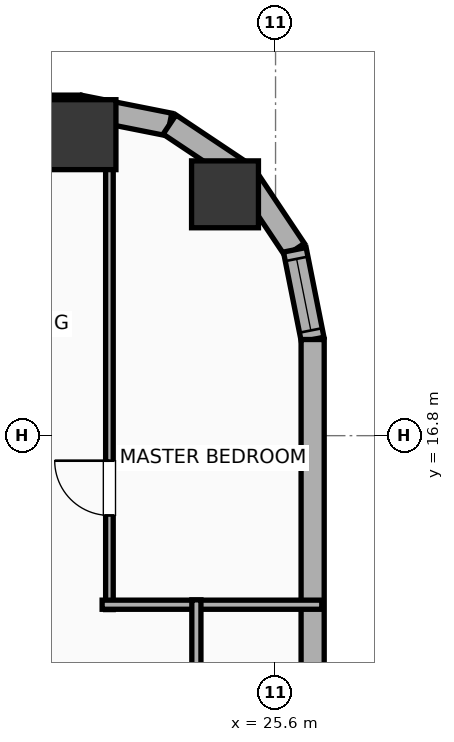
"""IFC4 building model, lengths in metres.
Left out: names, types, materials, properties, quantities, classifications, styles, units other than length and angle.
Written with IfcOpenShell. Run it as: python <this file> out.ifc"""

import sys

from ifc_helpers import new_model, si_unit, direction, frame, frame_2d, origin, origin_2d, place, context, subcontext, project, spatial, rectangle, hollow_rectangle, hollow_circle, extrude, element, fill, save


model = new_model("IFC4")
c1 = context("Model", 3, precision=1e-05, world=origin(), true_north=direction((0.0, 1.0)))
c2 = subcontext(c1, "Body", "Model", "MODEL_VIEW")
j1 = project(units=[si_unit("LENGTHUNIT", "METRE"), si_unit("PLANEANGLEUNIT", "RADIAN")], contexts=[c1])
p1 = place(None, origin())
s1 = spatial("IfcSite", under=j1, at=p1, CompositionType="ELEMENT")
p2 = place(p1, origin())
s2 = spatial("IfcBuilding", under=s1, at=p2, CompositionType="ELEMENT")
p3 = place(p2, frame((0.0, 0.0, 29.9)))
s3 = spatial("IfcBuildingStorey", under=s2, at=p3, CompositionType="ELEMENT", Elevation=29.9)
p4 = place(p3, frame((24.769, 20.769, 0.0), z_axis=(0.0, 0.0, 1.0), x_axis=(1.0, 0.0, 0.0)))
e1 = element("IfcColumn", 1, at=p4, inside=s3, PredefinedType="COLUMN", context=c2, shape_type="SweptSolid", body=[
    extrude(hollow_circle(Radius=0.55, WallThickness=0.036, at=origin_2d()), origin(), (0.0, 0.0, 1.0), 3.9),
])
p5 = place(p3, frame((22.4, 21.75, 0.0), z_axis=(0.0, 0.0, 1.0), x_axis=(1.0, 0.0, 0.0)))
e2 = element("IfcColumn", 2, at=p5, inside=s3, PredefinedType="COLUMN", context=c2, shape_type="SweptSolid", body=[
    extrude(hollow_rectangle(XDim=1.15, YDim=1.15, WallThickness=0.04, at=origin_2d()), origin(), (0.0, 0.0, 1.0), 3.9),
])
p6 = place(p3, frame((-29.581, 22.21, 0.0), z_axis=(0.0, 0.0, 1.0), x_axis=(1.0, 0.0, 0.0)))
e3 = element("IfcWall", 3, at=p6, inside=s3, PredefinedType="ELEMENTEDWALL", context=c2, shape_type="SweptSolid", body=[
    extrude(rectangle(XDim=51.963, YDim=0.38, at=frame_2d((25.981, 0.0))), origin(), (0.0, 0.0, 1.0), 2.54),
])
p7 = place(p6, frame((5.81, 0.0, 0.75)))
e4 = element("IfcOpeningElement", 4, at=p7, cuts=e3, PredefinedType="OPENING", context=c2, shape_type="SweptSolid", body=[
    extrude(rectangle(XDim=2.4, YDim=1.63, at=frame_2d((1.2, 0.815))), frame((0.0, 0.2, 0.0), z_axis=(0.0, -1.0, 0.0), x_axis=(1.0, 0.0, 0.0)), (0.0, 0.0, 1.0), 0.4),
])
p8 = place(p6, frame((42.952, 0.0, 0.75)))
e5 = element("IfcOpeningElement", 5, at=p8, cuts=e3, PredefinedType="OPENING", context=c2, shape_type="SweptSolid", body=[
    extrude(rectangle(XDim=2.4, YDim=1.63, at=frame_2d((1.2, 0.815))), frame((0.0, 0.2, 0.0), z_axis=(0.0, -1.0, 0.0), x_axis=(1.0, 0.0, 0.0)), (0.0, 0.0, 1.0), 0.4),
])
p9 = place(p6, frame((1.436, 0.0, 0.75)))
e6 = element("IfcOpeningElement", 6, at=p9, cuts=e3, PredefinedType="OPENING", context=c2, shape_type="SweptSolid", body=[
    extrude(rectangle(XDim=1.2, YDim=1.63, at=frame_2d((0.6, 0.815))), frame((0.0, 0.2, 0.0), z_axis=(0.0, -1.0, 0.0), x_axis=(1.0, 0.0, 0.0)), (0.0, 0.0, 1.0), 0.4),
])
p10 = place(p6, frame((3.686, 0.0, 0.75)))
e7 = element("IfcOpeningElement", 7, at=p10, cuts=e3, PredefinedType="OPENING", context=c2, shape_type="SweptSolid", body=[
    extrude(rectangle(XDim=1.2, YDim=1.63, at=frame_2d((0.6, 0.815))), frame((0.0, 0.2, 0.0), z_axis=(0.0, -1.0, 0.0), x_axis=(1.0, 0.0, 0.0)), (0.0, 0.0, 1.0), 0.4),
])
p11 = place(p6, frame((11.221, 0.0, 0.75)))
e8 = element("IfcOpeningElement", 8, at=p11, cuts=e3, PredefinedType="OPENING", context=c2, shape_type="SweptSolid", body=[
    extrude(rectangle(XDim=1.2, YDim=1.63, at=frame_2d((0.6, 0.815))), frame((0.0, 0.2, 0.0), z_axis=(0.0, -1.0, 0.0), x_axis=(1.0, 0.0, 0.0)), (0.0, 0.0, 1.0), 0.4),
])
p12 = place(p6, frame((17.686, 0.0, 0.75)))
e9 = element("IfcOpeningElement", 9, at=p12, cuts=e3, PredefinedType="OPENING", context=c2, shape_type="SweptSolid", body=[
    extrude(rectangle(XDim=1.2, YDim=1.63, at=frame_2d((0.6, 0.815))), frame((0.0, 0.2, 0.0), z_axis=(0.0, -1.0, 0.0), x_axis=(1.0, 0.0, 0.0)), (0.0, 0.0, 1.0), 0.4),
])
p13 = place(p6, frame((14.886, 0.0, 0.75)))
e10 = element("IfcOpeningElement", 10, at=p13, cuts=e3, PredefinedType="OPENING", context=c2, shape_type="SweptSolid", body=[
    extrude(rectangle(XDim=1.2, YDim=1.63, at=frame_2d((0.6, 0.815))), frame((0.0, 0.2, 0.0), z_axis=(0.0, -1.0, 0.0), x_axis=(1.0, 0.0, 0.0)), (0.0, 0.0, 1.0), 0.4),
])
p14 = place(p6, frame((22.181, 0.0, 0.75)))
e11 = element("IfcOpeningElement", 11, at=p14, cuts=e3, PredefinedType="OPENING", context=c2, shape_type="SweptSolid", body=[
    extrude(rectangle(XDim=1.2, YDim=1.63, at=frame_2d((0.6, 0.815))), frame((0.0, 0.2, 0.0), z_axis=(0.0, -1.0, 0.0), x_axis=(1.0, 0.0, 0.0)), (0.0, 0.0, 1.0), 0.4),
])
p15 = place(p6, frame((28.926, 0.0, 0.75)))
e12 = element("IfcOpeningElement", 12, at=p15, cuts=e3, PredefinedType="OPENING", context=c2, shape_type="SweptSolid", body=[
    extrude(rectangle(XDim=1.2, YDim=1.63, at=frame_2d((0.6, 0.815))), frame((0.0, 0.2, 0.0), z_axis=(0.0, -1.0, 0.0), x_axis=(1.0, 0.0, 0.0)), (0.0, 0.0, 1.0), 0.4),
])
p16 = place(p6, frame((26.126, 0.0, 0.75)))
e13 = element("IfcOpeningElement", 13, at=p16, cuts=e3, PredefinedType="OPENING", context=c2, shape_type="SweptSolid", body=[
    extrude(rectangle(XDim=1.2, YDim=1.63, at=frame_2d((0.6, 0.815))), frame((0.0, 0.2, 0.0), z_axis=(0.0, -1.0, 0.0), x_axis=(1.0, 0.0, 0.0)), (0.0, 0.0, 1.0), 0.4),
])
p17 = place(p6, frame((32.276, 0.0, 0.75)))
e14 = element("IfcOpeningElement", 14, at=p17, cuts=e3, PredefinedType="OPENING", context=c2, shape_type="SweptSolid", body=[
    extrude(rectangle(XDim=1.2, YDim=1.63, at=frame_2d((0.6, 0.815))), frame((0.0, 0.2, 0.0), z_axis=(0.0, -1.0, 0.0), x_axis=(1.0, 0.0, 0.0)), (0.0, 0.0, 1.0), 0.4),
])
p18 = place(p6, frame((35.076, 0.0, 0.75)))
e15 = element("IfcOpeningElement", 15, at=p18, cuts=e3, PredefinedType="OPENING", context=c2, shape_type="SweptSolid", body=[
    extrude(rectangle(XDim=1.2, YDim=1.63, at=frame_2d((0.6, 0.815))), frame((0.0, 0.2, 0.0), z_axis=(0.0, -1.0, 0.0), x_axis=(1.0, 0.0, 0.0)), (0.0, 0.0, 1.0), 0.4),
])
p19 = place(p6, frame((38.981, 0.0, 0.75)))
e16 = element("IfcOpeningElement", 16, at=p19, cuts=e3, PredefinedType="OPENING", context=c2, shape_type="SweptSolid", body=[
    extrude(rectangle(XDim=1.2, YDim=1.63, at=frame_2d((0.6, 0.815))), frame((0.0, 0.2, 0.0), z_axis=(0.0, -1.0, 0.0), x_axis=(1.0, 0.0, 0.0)), (0.0, 0.0, 1.0), 0.4),
])
p20 = place(p6, frame((46.276, 0.0, 0.75)))
e17 = element("IfcOpeningElement", 17, at=p20, cuts=e3, PredefinedType="OPENING", context=c2, shape_type="SweptSolid", body=[
    extrude(rectangle(XDim=1.2, YDim=1.63, at=frame_2d((0.6, 0.815))), frame((0.0, 0.2, 0.0), z_axis=(0.0, -1.0, 0.0), x_axis=(1.0, 0.0, 0.0)), (0.0, 0.0, 1.0), 0.4),
])
p21 = place(p6, frame((48.927, 0.0, 0.75)))
e18 = element("IfcOpeningElement", 18, at=p21, cuts=e3, PredefinedType="OPENING", context=c2, shape_type="SweptSolid", body=[
    extrude(rectangle(XDim=1.2, YDim=1.63, at=frame_2d((0.6, 0.815))), frame((0.0, 0.2, 0.0), z_axis=(0.0, -1.0, 0.0), x_axis=(1.0, 0.0, 0.0)), (0.0, 0.0, 1.0), 0.4),
])
p22 = place(p3, frame((22.381, 22.21, 0.0), z_axis=(0.0, 0.0, 1.0), x_axis=(0.980786132421, -0.195086038585, 0.0)))
e19 = element("IfcWall", 19, at=p22, inside=s3, PredefinedType="ELEMENTEDWALL", context=c2, shape_type="SweptSolid", body=[
    extrude(rectangle(XDim=1.504, YDim=0.38, at=frame_2d((0.752, 0.0))), origin(), (0.0, 0.0, 1.0), 2.54),
])
p23 = place(p3, frame((23.857, 21.917, 0.0), z_axis=(0.0, 0.0, 1.0), x_axis=(0.831392092774, -0.555686231674, 0.0)))
e20 = element("IfcWall", 20, at=p23, inside=s3, PredefinedType="ELEMENTEDWALL", context=c2, shape_type="SweptSolid", body=[
    extrude(rectangle(XDim=1.485, YDim=0.38, at=frame_2d((0.743, 0.0))), origin(), (0.0, 0.0, 1.0), 2.54),
])
p24 = place(p3, frame((25.091, 21.091, 0.0), z_axis=(0.0, 0.0, 1.0), x_axis=(0.555686231674, -0.831392092774, 0.0)))
e21 = element("IfcWall", 21, at=p24, inside=s3, PredefinedType="ELEMENTEDWALL", context=c2, shape_type="SweptSolid", body=[
    extrude(rectangle(XDim=1.485, YDim=0.38, at=frame_2d((0.743, 0.0))), origin(), (0.0, 0.0, 1.0), 3.65),
])
p25 = place(p3, frame((25.917, 19.857, 0.0), z_axis=(0.0, 0.0, 1.0), x_axis=(0.195086038585, -0.980786132421, 0.0)))
e22 = element("IfcWall", 22, at=p25, inside=s3, PredefinedType="ELEMENTEDWALL", context=c2, shape_type="SweptSolid", body=[
    extrude(rectangle(XDim=1.504, YDim=0.38, at=frame_2d((0.752, 0.0))), origin(), (0.0, 0.0, 1.0), 3.65),
])
p26 = place(p25, frame((0.152, 0.0, 0.75)))
e23 = element("IfcOpeningElement", 23, at=p26, cuts=e22, PredefinedType="OPENING", context=c2, shape_type="SweptSolid", body=[
    extrude(rectangle(XDim=1.2, YDim=2.05, at=frame_2d((0.6, 1.025))), frame((0.0, 0.2, 0.0), z_axis=(0.0, -1.0, 0.0), x_axis=(1.0, 0.0, 0.0)), (0.0, 0.0, 1.0), 0.4),
])
p27 = place(p3, frame((26.21, 18.381, 0.0), z_axis=(0.0, 0.0, 1.0), x_axis=(0.0, -1.0, 0.0)))
e24 = element("IfcWall", 24, at=p27, inside=s3, PredefinedType="ELEMENTEDWALL", context=c2, shape_type="SweptSolid", body=[
    extrude(rectangle(XDim=36.763, YDim=0.38, at=frame_2d((18.381, 0.0))), origin(), (0.0, 0.0, 1.0), 2.54),
])
p28 = place(p27, frame((33.537, 0.0, 0.75)))
e25 = element("IfcOpeningElement", 25, at=p28, cuts=e24, PredefinedType="OPENING", context=c2, shape_type="SweptSolid", body=[
    extrude(rectangle(XDim=1.2, YDim=1.63, at=frame_2d((0.6, 0.815))), frame((0.0, 0.2, 0.0), z_axis=(0.0, -1.0, 0.0), x_axis=(1.0, 0.0, 0.0)), (0.0, 0.0, 1.0), 0.4),
])
p29 = place(p3, frame((22.868, 13.94, 0.0), z_axis=(0.0, 0.0, 1.0), x_axis=(0.0, 1.0, 0.0)))
e26 = element("IfcWall", 26, at=p29, inside=s3, PredefinedType="PARTITIONING", context=c2, shape_type="SweptSolid", body=[
    extrude(rectangle(XDim=8.326, YDim=0.125, at=frame_2d((4.163, 0.0))), origin(), (0.0, 0.0, 1.0), 2.54),
])
p30 = place(p29, frame((1.548, 0.0, 0.0)))
e27 = element("IfcOpeningElement", 27, at=p30, cuts=e26, PredefinedType="OPENING", context=c2, shape_type="SweptSolid", body=[
    extrude(rectangle(XDim=0.9, YDim=2.05, at=frame_2d((0.45, 1.025))), frame((0.0, 0.073, 0.0), z_axis=(0.0, -1.0, 0.0), x_axis=(1.0, 0.0, 0.0)), (0.0, 0.0, 1.0), 0.145),
])
p31 = place(p3, frame((22.748, 14.02, 0.0), z_axis=(0.0, 0.0, 1.0), x_axis=(1.0, 0.0, 0.0)))
e28 = element("IfcWall", 28, at=p31, inside=s3, PredefinedType="PLUMBINGWALL", context=c2, shape_type="SweptSolid", body=[
    extrude(rectangle(XDim=3.612, YDim=0.15, at=frame_2d((1.806, 0.0))), origin(), (0.0, 0.0, 1.0), 3.65),
])
p32 = place(p3, frame((24.298, 10.78, 0.0), z_axis=(0.0, 0.0, 1.0), x_axis=(0.0, 1.0, 0.0)))
e29 = element("IfcWall", 29, at=p32, inside=s3, PredefinedType="PLUMBINGWALL", context=c2, shape_type="SweptSolid", body=[
    extrude(rectangle(XDim=3.32, YDim=0.15, at=frame_2d((1.66, 0.0))), origin(), (0.0, 0.0, 1.0), 3.65),
])
p33 = place(p32, frame((1.21, 0.0, 0.0)))
e30 = element("IfcOpeningElement", 30, at=p33, cuts=e29, PredefinedType="OPENING", context=c2, shape_type="SweptSolid", body=[
    extrude(rectangle(XDim=0.9, YDim=2.05, at=frame_2d((0.45, 1.025))), frame((0.0, 0.085, 0.0), z_axis=(0.0, -1.0, 0.0), x_axis=(1.0, 0.0, 0.0)), (0.0, 0.0, 1.0), 0.17),
])
p34 = place(p26, origin())
e31 = element("IfcWindow", 31, at=p34, inside=s3, PartitioningType="SINGLE_PANEL", PredefinedType="WINDOW", context=c2, shape_type="SweptSolid", body=[
    extrude(rectangle(XDim=1.2, YDim=2.05, at=frame_2d((0.6, 1.025))), frame((0.0, 0.03, 0.0), z_axis=(0.0, -1.0, 0.0), x_axis=(1.0, 0.0, 0.0)), (0.0, 0.0, 1.0), 0.06),
])
fill(e23, e31)
p35 = place(p30, origin())
e32 = element("IfcDoor", 32, at=p35, inside=s3, OperationType="SINGLE_SWING_RIGHT", PredefinedType="DOOR", context=c2, shape_type="SweptSolid", body=[
    extrude(rectangle(XDim=0.9, YDim=2.05, at=frame_2d((0.45, 1.025))), frame((0.0, 0.025, 0.0), z_axis=(0.0, -1.0, 0.0), x_axis=(1.0, 0.0, 0.0)), (0.0, 0.0, 1.0), 0.05),
])
fill(e27, e32)
save(model, sys.argv[1])
